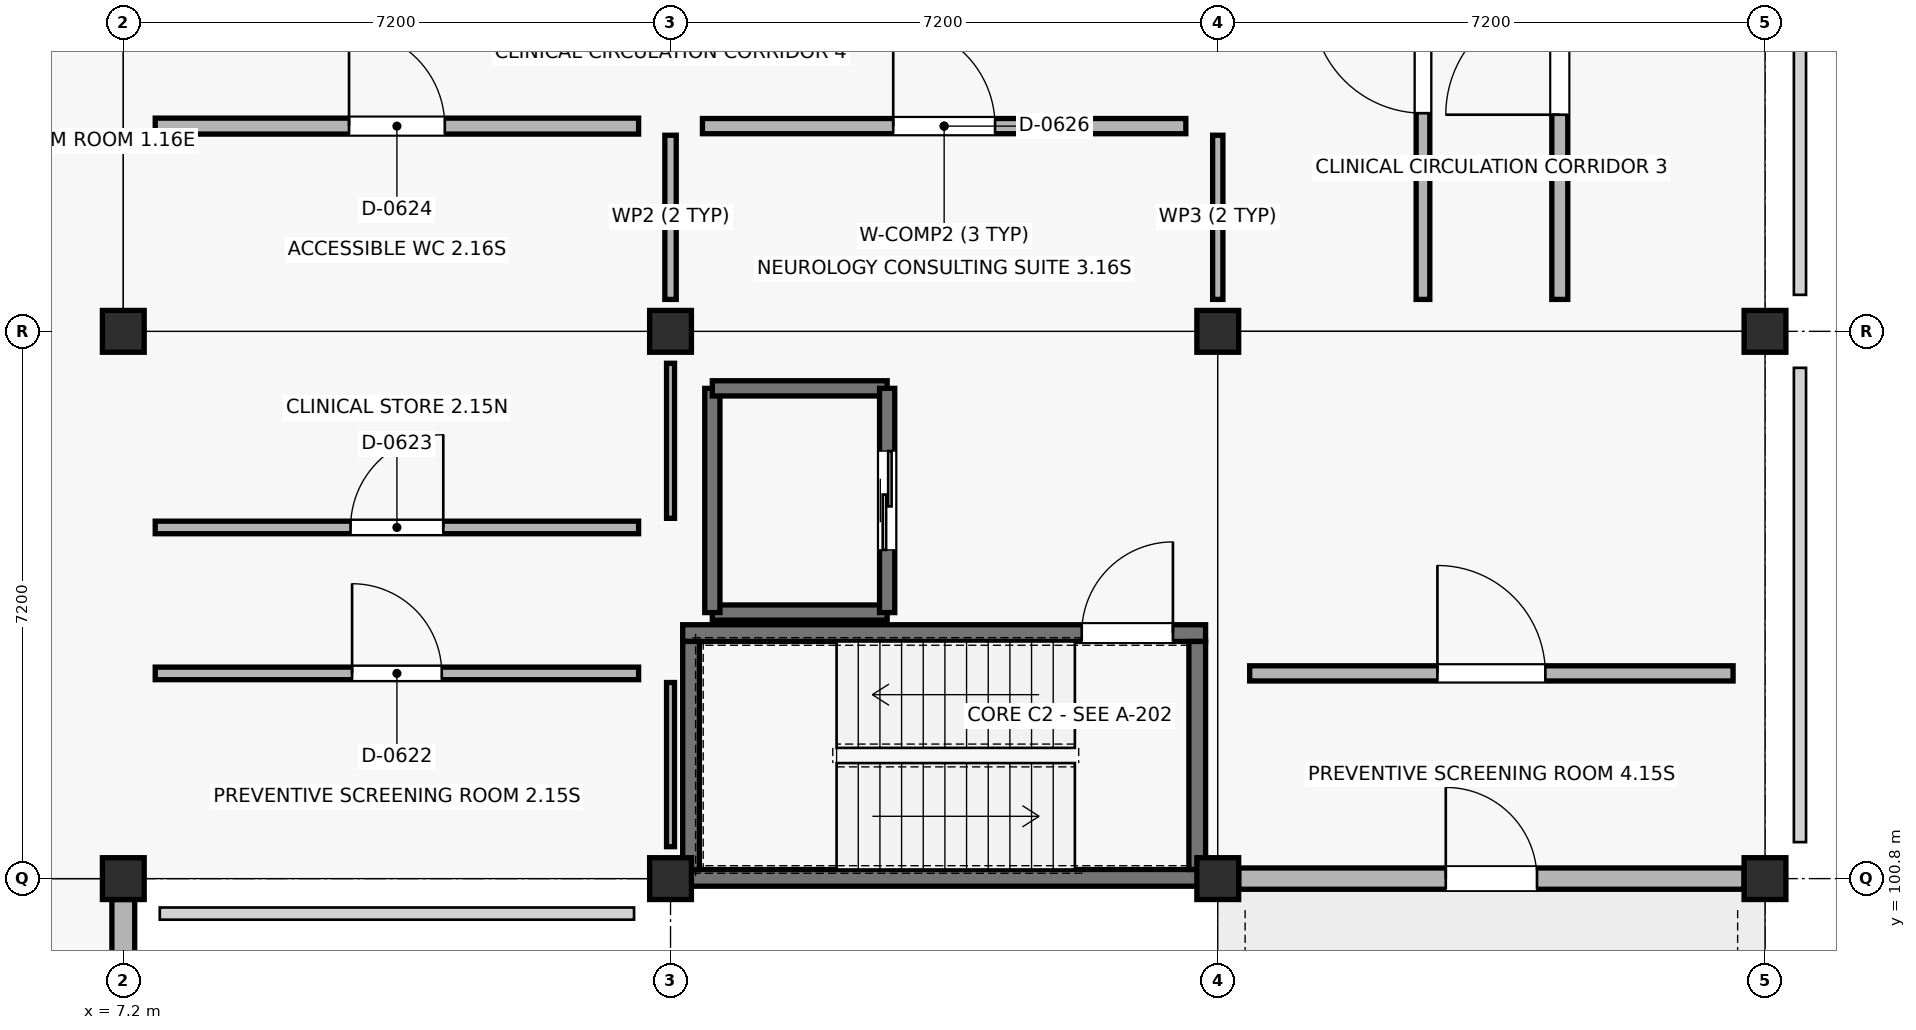
"""IFC4 building model, lengths in metres.
Left out: names, types, materials, properties, quantities, classifications, styles, units other than length and angle.
Written with IfcOpenShell. Run it as: python <this file> out.ifc"""

import sys

from ifc_helpers import new_model, si_unit, direction, frame, frame_2d, origin, origin_2d, place, context, subcontext, project, spatial, rectangle, extrude, element, fill, save


model = new_model("IFC4")
c1 = context("Model", 3, precision=1e-05, world=origin(), true_north=direction((0.0, 1.0)))
c2 = subcontext(c1, "Body", "Model", "MODEL_VIEW")
j1 = project(units=[si_unit("LENGTHUNIT", "METRE"), si_unit("PLANEANGLEUNIT", "RADIAN")], contexts=[c1])
p1 = place(None, origin())
s1 = spatial("IfcSite", under=j1, at=p1, CompositionType="ELEMENT")
p2 = place(p1, origin())
s2 = spatial("IfcBuilding", under=s1, at=p2, CompositionType="ELEMENT")
p3 = place(p2, frame((0.0, 0.0, 17.55)))
s3 = spatial("IfcBuildingStorey", under=s2, at=p3, CompositionType="ELEMENT", Elevation=17.55)
for number, where, z_axis, x_axis in (
    (1, (7.2, 100.8, 0.0), (0.0, 0.0, 1.0), (1.0, 0.0, 0.0)),
    (2, (7.2, 108.0, 0.0), (0.0, 0.0, 1.0), (1.0, 0.0, 0.0)),
    (3, (14.4, 100.8, 0.0), (0.0, 0.0, 1.0), (1.0, 0.0, 0.0)),
    (4, (14.4, 108.0, 0.0), (0.0, 0.0, 1.0), (1.0, 0.0, 0.0)),
    (5, (21.6, 100.8, 0.0), (0.0, 0.0, 1.0), (1.0, 0.0, 0.0)),
    (6, (21.6, 108.0, 0.0), (0.0, 0.0, 1.0), (1.0, 0.0, 0.0)),
    (7, (28.8, 100.8, 0.0), (0.0, 0.0, 1.0), (1.0, 0.0, 0.0)),
    (8, (28.8, 108.0, 0.0), (0.0, 0.0, 1.0), (1.0, 0.0, 0.0)),
):
    element("IfcColumn", number, at=place(p3, frame(where, z_axis=z_axis, x_axis=x_axis)), inside=s3, PredefinedType="COLUMN", context=c2, shape_type="SweptSolid", body=[
        extrude(rectangle(XDim=0.55, YDim=0.55, at=origin_2d()), origin(), (0.0, 0.0, 1.0), 4.05),
    ])
p4 = place(p3, frame((7.2, 93.875, 0.0), z_axis=(0.0, 0.0, 1.0), x_axis=(0.0, 1.0, 0.0)))
e9 = element("IfcWall", 9, at=p4, inside=s3, PredefinedType="STANDARD", context=c2, shape_type="SweptSolid", body=[
    extrude(rectangle(XDim=6.65, YDim=0.3, at=frame_2d((3.325, 0.0))), origin(), (0.0, 0.0, 1.0), 3.25),
])
p5 = place(p3, frame((21.875, 100.8, 0.0), z_axis=(0.0, 0.0, 1.0), x_axis=(1.0, 0.0, 0.0)))
e10 = element("IfcWall", 10, at=p5, inside=s3, PredefinedType="STANDARD", context=c2, shape_type="SweptSolid", body=[
    extrude(rectangle(XDim=6.65, YDim=0.28, at=frame_2d((3.325, 0.0))), origin(), (0.0, 0.0, 1.0), 3.15),
])
p6 = place(p5, frame((2.725, 0.0, 0.0)))
e11 = element("IfcOpeningElement", 11, at=p6, cuts=e10, PredefinedType="OPENING", context=c2, shape_type="SweptSolid", body=[
    extrude(rectangle(XDim=1.2, YDim=2.15, at=frame_2d((0.6, 1.075))), frame((0.0, 0.15, 0.0), z_axis=(0.0, -1.0, 0.0), x_axis=(1.0, 0.0, 0.0)), (0.0, 0.0, 1.0), 0.3),
])
p7 = place(p3, frame((14.56, 100.81, 0.0), z_axis=(0.0, 0.0, 1.0), x_axis=(1.0, 0.0, 0.0)))
e12 = element("IfcWall", 12, at=p7, inside=s3, PredefinedType="SHEAR", context=c2, shape_type="SweptSolid", body=[
    extrude(rectangle(XDim=6.88, YDim=0.22, at=frame_2d((3.44, 0.0))), origin(), (0.0, 0.0, 1.0), 3.8),
])
p8 = place(p3, frame((14.56, 104.03, 0.0), z_axis=(0.0, 0.0, 1.0), x_axis=(1.0, 0.0, 0.0)))
e13 = element("IfcWall", 13, at=p8, inside=s3, PredefinedType="SHEAR", context=c2, shape_type="SweptSolid", body=[
    extrude(rectangle(XDim=6.88, YDim=0.22, at=frame_2d((3.44, 0.0))), origin(), (0.0, 0.0, 1.0), 3.8),
])
p9 = place(p8, frame((5.25, 0.0, 0.0)))
e14 = element("IfcOpeningElement", 14, at=p9, cuts=e13, PredefinedType="OPENING", context=c2, shape_type="SweptSolid", body=[
    extrude(rectangle(XDim=1.2, YDim=2.15, at=frame_2d((0.6, 1.075))), frame((0.0, 0.12, 0.0), z_axis=(0.0, -1.0, 0.0), x_axis=(1.0, 0.0, 0.0)), (0.0, 0.0, 1.0), 0.24),
])
for number, where, z_axis, x_axis in (
    (15, (14.67, 100.92, 0.0), (0.0, 0.0, 1.0), (0.0, 1.0, 0.0)),
    (16, (21.33, 100.92, 0.0), (0.0, 0.0, 1.0), (0.0, 1.0, 0.0)),
):
    element("IfcWall", number, at=place(p3, frame(where, z_axis=z_axis, x_axis=x_axis)), inside=s3, PredefinedType="SHEAR", context=c2, shape_type="SweptSolid", body=[
        extrude(rectangle(XDim=3.0, YDim=0.22, at=frame_2d((1.5, 0.0))), origin(), (0.0, 0.0, 1.0), 3.8),
    ])
p10 = place(p3, frame((14.95, 104.3, 0.0), z_axis=(0.0, 0.0, 1.0), x_axis=(1.0, 0.0, 0.0)))
e17 = element("IfcWall", 17, at=p10, inside=s3, PredefinedType="SHEAR", context=c2, shape_type="SweptSolid", body=[
    extrude(rectangle(XDim=2.3, YDim=0.2, at=frame_2d((1.15, 0.0))), origin(), (0.0, 0.0, 1.0), 3.8),
])
p11 = place(p3, frame((14.95, 104.3, 0.0), z_axis=(0.0, 0.0, 1.0), x_axis=(0.0, 1.0, 0.0)))
e18 = element("IfcWall", 18, at=p11, inside=s3, PredefinedType="SHEAR", context=c2, shape_type="SweptSolid", body=[
    extrude(rectangle(XDim=2.95, YDim=0.2, at=frame_2d((1.475, 0.0))), origin(), (0.0, 0.0, 1.0), 3.8),
])
p12 = place(p3, frame((14.95, 107.25, 0.0), z_axis=(0.0, 0.0, 1.0), x_axis=(1.0, 0.0, 0.0)))
e19 = element("IfcWall", 19, at=p12, inside=s3, PredefinedType="SHEAR", context=c2, shape_type="SweptSolid", body=[
    extrude(rectangle(XDim=2.3, YDim=0.2, at=frame_2d((1.15, 0.0))), origin(), (0.0, 0.0, 1.0), 3.8),
])
p13 = place(p3, frame((17.25, 104.3, 0.0), z_axis=(0.0, 0.0, 1.0), x_axis=(0.0, 1.0, 0.0)))
e20 = element("IfcWall", 20, at=p13, inside=s3, PredefinedType="SHEAR", context=c2, shape_type="SweptSolid", body=[
    extrude(rectangle(XDim=2.95, YDim=0.2, at=frame_2d((1.475, 0.0))), origin(), (0.0, 0.0, 1.0), 3.8),
])
p14 = place(p13, frame((0.825, 0.0, 0.0)))
e21 = element("IfcOpeningElement", 21, at=p14, cuts=e20, PredefinedType="OPENING", context=c2, shape_type="SweptSolid", body=[
    extrude(rectangle(XDim=1.3, YDim=2.15, at=frame_2d((0.65, 1.075))), frame((0.0, 0.11, 0.0), z_axis=(0.0, -1.0, 0.0), x_axis=(1.0, 0.0, 0.0)), (0.0, 0.0, 1.0), 0.22),
])
p15 = place(p3, frame((7.62, 103.5, 0.0), z_axis=(0.0, 0.0, 1.0), x_axis=(1.0, 0.0, 0.0)))
e22 = element("IfcWall", 22, at=p15, inside=s3, PredefinedType="PARTITIONING", context=c2, shape_type="SweptSolid", body=[
    extrude(rectangle(XDim=6.36, YDim=0.165, at=frame_2d((3.18, 0.0))), origin(), (0.0, 0.0, 1.0), 2.94),
])
p16 = place(p15, frame((2.59, 0.0, 0.0)))
e23 = element("IfcOpeningElement", 23, at=p16, cuts=e22, PredefinedType="OPENING", context=c2, shape_type="SweptSolid", body=[
    extrude(rectangle(XDim=1.18, YDim=2.19, at=frame_2d((0.59, 1.095))), frame((0.0, 0.093, 0.0), z_axis=(0.0, -1.0, 0.0), x_axis=(1.0, 0.0, 0.0)), (0.0, 0.0, 1.0), 0.185),
])
p17 = place(p3, frame((14.4, 101.22, 0.0), z_axis=(0.0, 0.0, 1.0), x_axis=(0.0, 1.0, 0.0)))
e24 = element("IfcWall", 24, at=p17, inside=s3, PredefinedType="PARTITIONING", context=c2, shape_type="SweptSolid", body=[
    extrude(rectangle(XDim=2.16, YDim=0.105, at=frame_2d((1.08, 0.0))), origin(), (0.0, 0.0, 1.0), 2.94),
])
p18 = place(p3, frame((7.62, 105.42, 0.0), z_axis=(0.0, 0.0, 1.0), x_axis=(1.0, 0.0, 0.0)))
e25 = element("IfcWall", 25, at=p18, inside=s3, PredefinedType="PARTITIONING", context=c2, shape_type="SweptSolid", body=[
    extrude(rectangle(XDim=6.36, YDim=0.165, at=frame_2d((3.18, 0.0))), origin(), (0.0, 0.0, 1.0), 2.94),
])
p19 = place(p18, frame((2.57, 0.0, 0.0)))
e26 = element("IfcOpeningElement", 26, at=p19, cuts=e25, PredefinedType="OPENING", context=c2, shape_type="SweptSolid", body=[
    extrude(rectangle(XDim=1.22, YDim=2.19, at=frame_2d((0.61, 1.095))), frame((0.0, 0.093, 0.0), z_axis=(0.0, -1.0, 0.0), x_axis=(1.0, 0.0, 0.0)), (0.0, 0.0, 1.0), 0.185),
])
p20 = place(p3, frame((14.4, 105.54, 0.0), z_axis=(0.0, 0.0, 1.0), x_axis=(0.0, 1.0, 0.0)))
e27 = element("IfcWall", 27, at=p20, inside=s3, PredefinedType="PARTITIONING", context=c2, shape_type="SweptSolid", body=[
    extrude(rectangle(XDim=2.04, YDim=0.105, at=frame_2d((1.02, 0.0))), origin(), (0.0, 0.0, 1.0), 2.94),
])
p21 = place(p3, frame((7.62, 110.7, 0.0), z_axis=(0.0, 0.0, 1.0), x_axis=(1.0, 0.0, 0.0)))
e28 = element("IfcWall", 28, at=p21, inside=s3, PredefinedType="PLUMBINGWALL", context=c2, shape_type="SweptSolid", body=[
    extrude(rectangle(XDim=6.36, YDim=0.21, at=frame_2d((3.18, 0.0))), origin(), (0.0, 0.0, 1.0), 2.94),
])
p22 = place(p21, frame((2.55, 0.0, 0.0)))
e29 = element("IfcOpeningElement", 29, at=p22, cuts=e28, PredefinedType="OPENING", context=c2, shape_type="SweptSolid", body=[
    extrude(rectangle(XDim=1.26, YDim=2.19, at=frame_2d((0.63, 1.095))), frame((0.0, 0.115, 0.0), z_axis=(0.0, -1.0, 0.0), x_axis=(1.0, 0.0, 0.0)), (0.0, 0.0, 1.0), 0.23),
])
p23 = place(p3, frame((14.4, 108.42, 0.0), z_axis=(0.0, 0.0, 1.0), x_axis=(0.0, 1.0, 0.0)))
e30 = element("IfcWall", 30, at=p23, inside=s3, PredefinedType="PARTITIONING", context=c2, shape_type="SweptSolid", body=[
    extrude(rectangle(XDim=2.16, YDim=0.15, at=frame_2d((1.08, 0.0))), origin(), (0.0, 0.0, 1.0), 2.94),
])
p24 = place(p3, frame((14.82, 110.7, 0.0), z_axis=(0.0, 0.0, 1.0), x_axis=(1.0, 0.0, 0.0)))
e31 = element("IfcWall", 31, at=p24, inside=s3, PredefinedType="SOLIDWALL", context=c2, shape_type="SweptSolid", body=[
    extrude(rectangle(XDim=6.36, YDim=0.2, at=frame_2d((3.18, 0.0))), origin(), (0.0, 0.0, 1.0), 2.94),
])
p25 = place(p24, frame((2.51, 0.0, 0.0)))
e32 = element("IfcOpeningElement", 32, at=p25, cuts=e31, PredefinedType="OPENING", context=c2, shape_type="SweptSolid", body=[
    extrude(rectangle(XDim=1.34, YDim=2.19, at=frame_2d((0.67, 1.095))), frame((0.0, 0.11, 0.0), z_axis=(0.0, -1.0, 0.0), x_axis=(1.0, 0.0, 0.0)), (0.0, 0.0, 1.0), 0.22),
])
p26 = place(p3, frame((21.6, 108.42, 0.0), z_axis=(0.0, 0.0, 1.0), x_axis=(0.0, 1.0, 0.0)))
e33 = element("IfcWall", 33, at=p26, inside=s3, PredefinedType="PARTITIONING", context=c2, shape_type="SweptSolid", body=[
    extrude(rectangle(XDim=2.16, YDim=0.135, at=frame_2d((1.08, 0.0))), origin(), (0.0, 0.0, 1.0), 2.94),
])
p27 = place(p3, frame((22.02, 103.5, 0.0), z_axis=(0.0, 0.0, 1.0), x_axis=(1.0, 0.0, 0.0)))
e34 = element("IfcWall", 34, at=p27, inside=s3, PredefinedType="SOLIDWALL", context=c2, shape_type="SweptSolid", body=[
    extrude(rectangle(XDim=6.36, YDim=0.2, at=frame_2d((3.18, 0.0))), origin(), (0.0, 0.0, 1.0), 2.94),
])
p28 = place(p27, frame((2.47, 0.0, 0.0)))
e35 = element("IfcOpeningElement", 35, at=p28, cuts=e34, PredefinedType="OPENING", context=c2, shape_type="SweptSolid", body=[
    extrude(rectangle(XDim=1.42, YDim=2.19, at=frame_2d((0.71, 1.095))), frame((0.0, 0.11, 0.0), z_axis=(0.0, -1.0, 0.0), x_axis=(1.0, 0.0, 0.0)), (0.0, 0.0, 1.0), 0.22),
])
p29 = place(p3, frame((24.3, 108.42, 0.0), z_axis=(0.0, 0.0, 1.0), x_axis=(0.0, 1.0, 0.0)))
e36 = element("IfcWall", 36, at=p29, inside=s3, PredefinedType="PARTITIONING", context=c2, shape_type="SweptSolid", body=[
    extrude(rectangle(XDim=6.36, YDim=0.18, at=frame_2d((3.18, 0.0))), origin(), (0.0, 0.0, 1.0), 2.94),
])
p30 = place(p29, frame((2.45, 0.0, 0.0)))
e37 = element("IfcOpeningElement", 37, at=p30, cuts=e36, PredefinedType="OPENING", context=c2, shape_type="SweptSolid", body=[
    extrude(rectangle(XDim=1.46, YDim=2.19, at=frame_2d((0.73, 1.095))), frame((0.0, 0.1, 0.0), z_axis=(0.0, -1.0, 0.0), x_axis=(1.0, 0.0, 0.0)), (0.0, 0.0, 1.0), 0.2),
])
p31 = place(p3, frame((26.1, 108.42, 0.0), z_axis=(0.0, 0.0, 1.0), x_axis=(0.0, 1.0, 0.0)))
e38 = element("IfcWall", 38, at=p31, inside=s3, PredefinedType="PLUMBINGWALL", context=c2, shape_type="SweptSolid", body=[
    extrude(rectangle(XDim=6.36, YDim=0.21, at=frame_2d((3.18, 0.0))), origin(), (0.0, 0.0, 1.0), 2.94),
])
p32 = place(p31, frame((2.43, 0.0, 0.0)))
e39 = element("IfcOpeningElement", 39, at=p32, cuts=e38, PredefinedType="OPENING", context=c2, shape_type="SweptSolid", body=[
    extrude(rectangle(XDim=1.5, YDim=2.19, at=frame_2d((0.75, 1.095))), frame((0.0, 0.115, 0.0), z_axis=(0.0, -1.0, 0.0), x_axis=(1.0, 0.0, 0.0)), (0.0, 0.0, 1.0), 0.23),
])
p33 = place(p6, origin())
e40 = element("IfcDoor", 40, at=p33, inside=s3, OperationType="SINGLE_SWING_LEFT", PredefinedType="DOOR", context=c2, shape_type="SweptSolid", body=[
    extrude(rectangle(XDim=1.2, YDim=2.15, at=frame_2d((0.6, 1.075))), frame((0.0, 0.025, 0.0), z_axis=(0.0, -1.0, 0.0), x_axis=(1.0, 0.0, 0.0)), (0.0, 0.0, 1.0), 0.05),
])
fill(e11, e40)
p34 = place(p9, origin())
e41 = element("IfcDoor", 41, at=p34, inside=s3, OperationType="SINGLE_SWING_RIGHT", PredefinedType="DOOR", context=c2, shape_type="SweptSolid", body=[
    extrude(rectangle(XDim=1.2, YDim=2.15, at=frame_2d((0.6, 1.075))), frame((0.0, 0.025, 0.0), z_axis=(0.0, -1.0, 0.0), x_axis=(1.0, 0.0, 0.0)), (0.0, 0.0, 1.0), 0.05),
])
fill(e14, e41)
p35 = place(p14, origin())
e42 = element("IfcDoor", 42, at=p35, inside=s3, OperationType="SLIDING_TO_LEFT", PredefinedType="DOOR", context=c2, shape_type="SweptSolid", body=[
    extrude(rectangle(XDim=1.3, YDim=2.15, at=frame_2d((0.65, 1.075))), frame((0.0, 0.025, 0.0), z_axis=(0.0, -1.0, 0.0), x_axis=(1.0, 0.0, 0.0)), (0.0, 0.0, 1.0), 0.05),
])
fill(e21, e42)
p36 = place(p16, origin())
e43 = element("IfcDoor", 43, at=p36, inside=s3, OperationType="SINGLE_SWING_LEFT", PredefinedType="DOOR", context=c2, shape_type="SweptSolid", body=[
    extrude(rectangle(XDim=1.18, YDim=2.19, at=frame_2d((0.59, 1.095))), frame((0.0, 0.025, 0.0), z_axis=(0.0, -1.0, 0.0), x_axis=(1.0, 0.0, 0.0)), (0.0, 0.0, 1.0), 0.05),
])
fill(e23, e43)
p37 = place(p19, origin())
e44 = element("IfcDoor", 44, at=p37, inside=s3, OperationType="SINGLE_SWING_RIGHT", PredefinedType="DOOR", context=c2, shape_type="SweptSolid", body=[
    extrude(rectangle(XDim=1.22, YDim=2.19, at=frame_2d((0.61, 1.095))), frame((0.0, 0.025, 0.0), z_axis=(0.0, -1.0, 0.0), x_axis=(1.0, 0.0, 0.0)), (0.0, 0.0, 1.0), 0.05),
])
fill(e26, e44)
p38 = place(p22, origin())
e45 = element("IfcDoor", 45, at=p38, inside=s3, OperationType="SINGLE_SWING_LEFT", PredefinedType="DOOR", context=c2, shape_type="SweptSolid", body=[
    extrude(rectangle(XDim=1.26, YDim=2.19, at=frame_2d((0.63, 1.095))), frame((0.0, 0.025, 0.0), z_axis=(0.0, -1.0, 0.0), x_axis=(1.0, 0.0, 0.0)), (0.0, 0.0, 1.0), 0.05),
])
fill(e29, e45)
p39 = place(p25, origin())
e46 = element("IfcDoor", 46, at=p39, inside=s3, OperationType="SINGLE_SWING_LEFT", PredefinedType="DOOR", context=c2, shape_type="SweptSolid", body=[
    extrude(rectangle(XDim=1.34, YDim=2.19, at=frame_2d((0.67, 1.095))), frame((0.0, 0.025, 0.0), z_axis=(0.0, -1.0, 0.0), x_axis=(1.0, 0.0, 0.0)), (0.0, 0.0, 1.0), 0.05),
])
fill(e32, e46)
p40 = place(p28, origin())
e47 = element("IfcDoor", 47, at=p40, inside=s3, OperationType="SINGLE_SWING_LEFT", PredefinedType="DOOR", context=c2, shape_type="SweptSolid", body=[
    extrude(rectangle(XDim=1.42, YDim=2.19, at=frame_2d((0.71, 1.095))), frame((0.0, 0.025, 0.0), z_axis=(0.0, -1.0, 0.0), x_axis=(1.0, 0.0, 0.0)), (0.0, 0.0, 1.0), 0.05),
])
fill(e35, e47)
p41 = place(p30, origin())
e48 = element("IfcDoor", 48, at=p41, inside=s3, OperationType="SINGLE_SWING_RIGHT", PredefinedType="DOOR", context=c2, shape_type="SweptSolid", body=[
    extrude(rectangle(XDim=1.46, YDim=2.19, at=frame_2d((0.73, 1.095))), frame((0.0, 0.025, 0.0), z_axis=(0.0, -1.0, 0.0), x_axis=(1.0, 0.0, 0.0)), (0.0, 0.0, 1.0), 0.05),
])
fill(e37, e48)
p42 = place(p32, origin())
e49 = element("IfcDoor", 49, at=p42, inside=s3, OperationType="SINGLE_SWING_LEFT", PredefinedType="DOOR", context=c2, shape_type="SweptSolid", body=[
    extrude(rectangle(XDim=1.5, YDim=2.19, at=frame_2d((0.75, 1.095))), frame((0.0, 0.025, 0.0), z_axis=(0.0, -1.0, 0.0), x_axis=(1.0, 0.0, 0.0)), (0.0, 0.0, 1.0), 0.05),
])
fill(e39, e49)
save(model, sys.argv[1])
